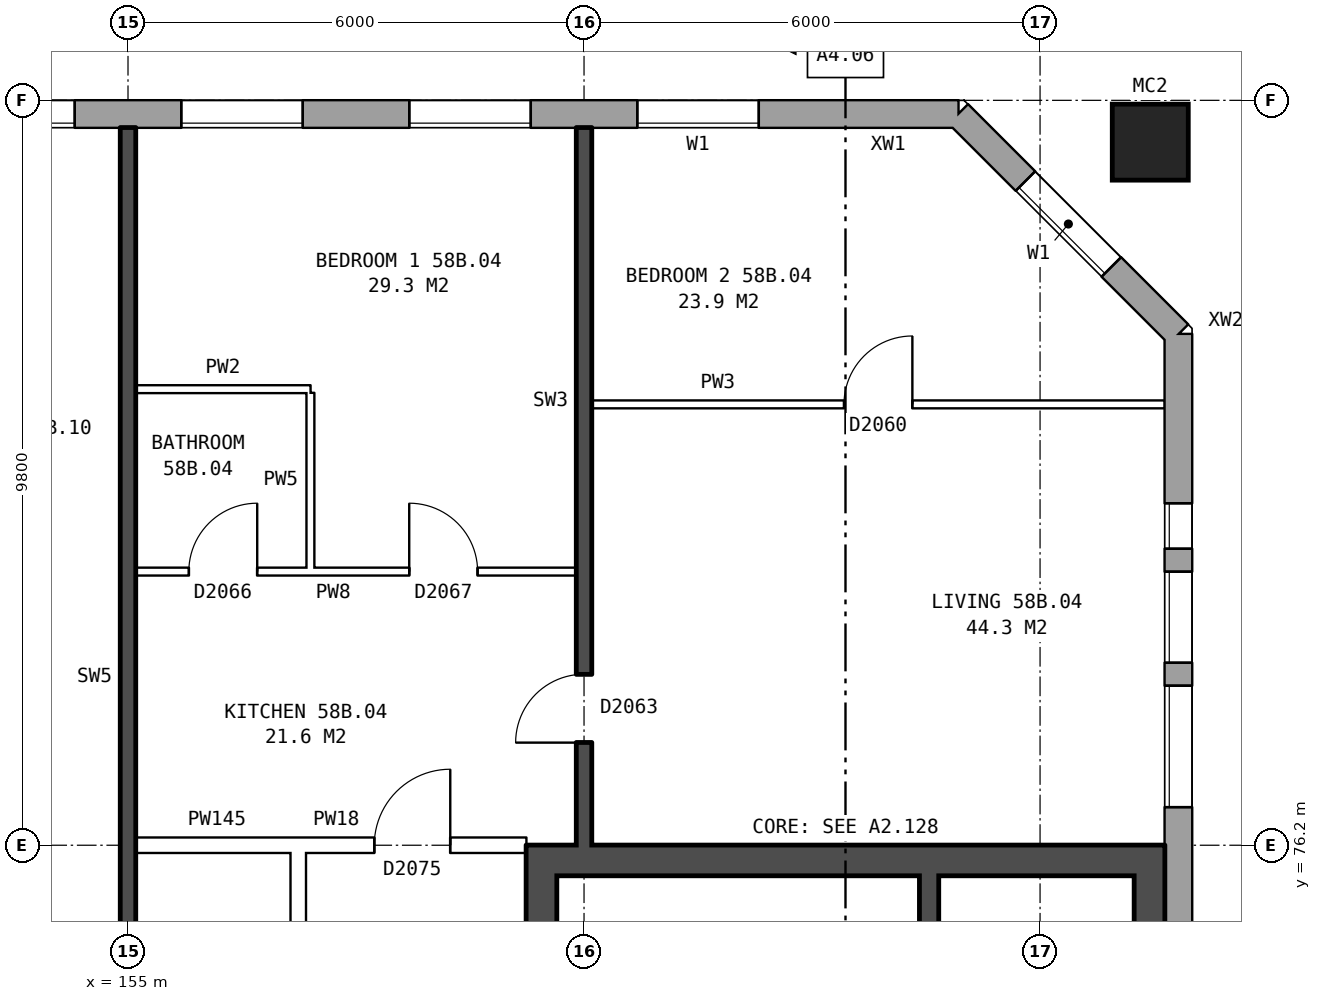
"""IFC4 building model, lengths in metres.
Left out: names, types, materials, properties, quantities, classifications, styles, units other than length and angle.
Written with IfcOpenShell. Run it as: python <this file> out.ifc"""

import sys

from ifc_helpers import new_model, si_unit, direction, frame, frame_2d, origin, origin_2d, place, context, subcontext, project, spatial, rectangle, hollow_rectangle, extrude, element, fill, save


model = new_model("IFC4")
c1 = context("Model", 3, precision=1e-05, world=origin(), true_north=direction((0.0, 1.0)))
c2 = subcontext(c1, "Body", "Model", "MODEL_VIEW")
j1 = project(units=[si_unit("LENGTHUNIT", "METRE"), si_unit("PLANEANGLEUNIT", "RADIAN")], contexts=[c1])
p1 = place(None, origin())
s1 = spatial("IfcSite", under=j1, at=p1, CompositionType="ELEMENT")
p2 = place(p1, origin())
s2 = spatial("IfcBuilding", under=s1, at=p2, CompositionType="ELEMENT")
p3 = place(p2, frame((0.0, 0.0, 205.9)))
s3 = spatial("IfcBuildingStorey", under=s2, at=p3, CompositionType="ELEMENT", Elevation=205.9)
p4 = place(p3, frame((168.45, 85.45, 0.0), z_axis=(0.0, 0.0, 1.0), x_axis=(1.0, 0.0, 0.0)))
e1 = element("IfcColumn", 1, at=p4, inside=s3, PredefinedType="COLUMN", context=c2, shape_type="SweptSolid", body=[
    extrude(hollow_rectangle(XDim=1.0, YDim=1.0, WallThickness=0.055, at=origin_2d()), origin(), (0.0, 0.0, 1.0), 3.1),
])
p5 = place(p3, frame((168.82, 57.075, 0.0), z_axis=(0.0, 0.0, 1.0), x_axis=(0.0, 1.0, 0.0)))
e2 = element("IfcWall", 2, at=p5, inside=s3, PredefinedType="STANDARD", context=c2, shape_type="SweptSolid", body=[
    extrude(rectangle(XDim=25.851, YDim=0.36, at=frame_2d((12.925, 0.0))), origin(), (0.0, 0.0, 1.0), 2.85),
])
p6 = place(p5, frame((2.225, 0.0, 0.8)))
e3 = element("IfcOpeningElement", 3, at=p6, cuts=e2, PredefinedType="OPENING", context=c2, shape_type="SweptSolid", body=[
    extrude(rectangle(XDim=0.6, YDim=0.9, at=frame_2d((0.3, 0.45))), frame((0.0, 0.19, 0.0), z_axis=(0.0, -1.0, 0.0), x_axis=(1.0, 0.0, 0.0)), (0.0, 0.0, 1.0), 0.38),
])
p7 = place(p5, frame((4.625, 0.0, 0.8)))
e4 = element("IfcOpeningElement", 4, at=p7, cuts=e2, PredefinedType="OPENING", context=c2, shape_type="SweptSolid", body=[
    extrude(rectangle(XDim=1.6, YDim=1.8, at=frame_2d((0.8, 0.9))), frame((0.0, 0.19, 0.0), z_axis=(0.0, -1.0, 0.0), x_axis=(1.0, 0.0, 0.0)), (0.0, 0.0, 1.0), 0.38),
])
p8 = place(p5, frame((19.625, 0.0, 0.8)))
e5 = element("IfcOpeningElement", 5, at=p8, cuts=e2, PredefinedType="OPENING", context=c2, shape_type="SweptSolid", body=[
    extrude(rectangle(XDim=1.6, YDim=1.8, at=frame_2d((0.8, 0.9))), frame((0.0, 0.19, 0.0), z_axis=(0.0, -1.0, 0.0), x_axis=(1.0, 0.0, 0.0)), (0.0, 0.0, 1.0), 0.38),
])
p9 = place(p5, frame((21.525, 0.0, 0.8)))
e6 = element("IfcOpeningElement", 6, at=p9, cuts=e2, PredefinedType="OPENING", context=c2, shape_type="SweptSolid", body=[
    extrude(rectangle(XDim=1.2, YDim=1.8, at=frame_2d((0.6, 0.9))), frame((0.0, 0.19, 0.0), z_axis=(0.0, -1.0, 0.0), x_axis=(1.0, 0.0, 0.0)), (0.0, 0.0, 1.0), 0.38),
])
p10 = place(p5, frame((3.125, 0.0, 0.8)))
e7 = element("IfcOpeningElement", 7, at=p10, cuts=e2, PredefinedType="OPENING", context=c2, shape_type="SweptSolid", body=[
    extrude(rectangle(XDim=1.2, YDim=1.8, at=frame_2d((0.6, 0.9))), frame((0.0, 0.19, 0.0), z_axis=(0.0, -1.0, 0.0), x_axis=(1.0, 0.0, 0.0)), (0.0, 0.0, 1.0), 0.38),
])
p11 = place(p5, frame((23.025, 0.0, 0.8)))
e8 = element("IfcOpeningElement", 8, at=p11, cuts=e2, PredefinedType="OPENING", context=c2, shape_type="SweptSolid", body=[
    extrude(rectangle(XDim=0.6, YDim=0.9, at=frame_2d((0.3, 0.45))), frame((0.0, 0.19, 0.0), z_axis=(0.0, -1.0, 0.0), x_axis=(1.0, 0.0, 0.0)), (0.0, 0.0, 1.0), 0.38),
])
p12 = place(p3, frame((168.82, 82.925, 0.0), z_axis=(0.0, 0.0, 1.0), x_axis=(-0.707106781187, 0.707106781187, 0.0)))
e9 = element("IfcWall", 9, at=p12, inside=s3, PredefinedType="STANDARD", context=c2, shape_type="SweptSolid", body=[
    extrude(rectangle(XDim=4.094, YDim=0.36, at=frame_2d((2.047, 0.0))), origin(), (0.0, 0.0, 1.0), 2.85),
])
p13 = place(p12, frame((1.247, 0.0, 0.8)))
e10 = element("IfcOpeningElement", 10, at=p13, cuts=e9, PredefinedType="OPENING", context=c2, shape_type="SweptSolid", body=[
    extrude(rectangle(XDim=1.6, YDim=1.8, at=frame_2d((0.8, 0.9))), frame((0.0, 0.19, 0.0), z_axis=(0.0, -1.0, 0.0), x_axis=(1.0, 0.0, 0.0)), (0.0, 0.0, 1.0), 0.38),
])
p14 = place(p3, frame((165.925, 85.82, 0.0), z_axis=(0.0, 0.0, 1.0), x_axis=(-1.0, 0.0, 0.0)))
e11 = element("IfcWall", 11, at=p14, inside=s3, PredefinedType="STANDARD", context=c2, shape_type="SweptSolid", body=[
    extrude(rectangle(XDim=33.875, YDim=0.36, at=frame_2d((16.938, 0.0))), origin(), (0.0, 0.0, 1.0), 2.85),
])
p15 = place(p14, frame((2.625, 0.0, 0.8)))
e12 = element("IfcOpeningElement", 12, at=p15, cuts=e11, PredefinedType="OPENING", context=c2, shape_type="SweptSolid", body=[
    extrude(rectangle(XDim=1.6, YDim=1.8, at=frame_2d((0.8, 0.9))), frame((0.0, 0.19, 0.0), z_axis=(0.0, -1.0, 0.0), x_axis=(1.0, 0.0, 0.0)), (0.0, 0.0, 1.0), 0.38),
])
p16 = place(p14, frame((5.625, 0.0, 0.8)))
e13 = element("IfcOpeningElement", 13, at=p16, cuts=e11, PredefinedType="OPENING", context=c2, shape_type="SweptSolid", body=[
    extrude(rectangle(XDim=1.6, YDim=1.8, at=frame_2d((0.8, 0.9))), frame((0.0, 0.19, 0.0), z_axis=(0.0, -1.0, 0.0), x_axis=(1.0, 0.0, 0.0)), (0.0, 0.0, 1.0), 0.38),
])
p17 = place(p14, frame((8.625, 0.0, 0.8)))
e14 = element("IfcOpeningElement", 14, at=p17, cuts=e11, PredefinedType="OPENING", context=c2, shape_type="SweptSolid", body=[
    extrude(rectangle(XDim=1.6, YDim=1.8, at=frame_2d((0.8, 0.9))), frame((0.0, 0.19, 0.0), z_axis=(0.0, -1.0, 0.0), x_axis=(1.0, 0.0, 0.0)), (0.0, 0.0, 1.0), 0.38),
])
p18 = place(p14, frame((11.625, 0.0, 0.8)))
e15 = element("IfcOpeningElement", 15, at=p18, cuts=e11, PredefinedType="OPENING", context=c2, shape_type="SweptSolid", body=[
    extrude(rectangle(XDim=1.6, YDim=1.8, at=frame_2d((0.8, 0.9))), frame((0.0, 0.19, 0.0), z_axis=(0.0, -1.0, 0.0), x_axis=(1.0, 0.0, 0.0)), (0.0, 0.0, 1.0), 0.38),
])
p19 = place(p14, frame((14.625, 0.0, 0.8)))
e16 = element("IfcOpeningElement", 16, at=p19, cuts=e11, PredefinedType="OPENING", context=c2, shape_type="SweptSolid", body=[
    extrude(rectangle(XDim=1.6, YDim=1.8, at=frame_2d((0.8, 0.9))), frame((0.0, 0.19, 0.0), z_axis=(0.0, -1.0, 0.0), x_axis=(1.0, 0.0, 0.0)), (0.0, 0.0, 1.0), 0.38),
])
p20 = place(p14, frame((17.625, 0.0, 0.8)))
e17 = element("IfcOpeningElement", 17, at=p20, cuts=e11, PredefinedType="OPENING", context=c2, shape_type="SweptSolid", body=[
    extrude(rectangle(XDim=1.6, YDim=1.8, at=frame_2d((0.8, 0.9))), frame((0.0, 0.19, 0.0), z_axis=(0.0, -1.0, 0.0), x_axis=(1.0, 0.0, 0.0)), (0.0, 0.0, 1.0), 0.38),
])
p21 = place(p14, frame((20.625, 0.0, 0.8)))
e18 = element("IfcOpeningElement", 18, at=p21, cuts=e11, PredefinedType="OPENING", context=c2, shape_type="SweptSolid", body=[
    extrude(rectangle(XDim=1.6, YDim=1.8, at=frame_2d((0.8, 0.9))), frame((0.0, 0.19, 0.0), z_axis=(0.0, -1.0, 0.0), x_axis=(1.0, 0.0, 0.0)), (0.0, 0.0, 1.0), 0.38),
])
p22 = place(p14, frame((23.625, 0.0, 0.8)))
e19 = element("IfcOpeningElement", 19, at=p22, cuts=e11, PredefinedType="OPENING", context=c2, shape_type="SweptSolid", body=[
    extrude(rectangle(XDim=1.6, YDim=1.8, at=frame_2d((0.8, 0.9))), frame((0.0, 0.19, 0.0), z_axis=(0.0, -1.0, 0.0), x_axis=(1.0, 0.0, 0.0)), (0.0, 0.0, 1.0), 0.38),
])
p23 = place(p14, frame((26.625, 0.0, 0.8)))
e20 = element("IfcOpeningElement", 20, at=p23, cuts=e11, PredefinedType="OPENING", context=c2, shape_type="SweptSolid", body=[
    extrude(rectangle(XDim=1.6, YDim=1.8, at=frame_2d((0.8, 0.9))), frame((0.0, 0.19, 0.0), z_axis=(0.0, -1.0, 0.0), x_axis=(1.0, 0.0, 0.0)), (0.0, 0.0, 1.0), 0.38),
])
p24 = place(p14, frame((29.125, 0.0, 0.8)))
e21 = element("IfcOpeningElement", 21, at=p24, cuts=e11, PredefinedType="OPENING", context=c2, shape_type="SweptSolid", body=[
    extrude(rectangle(XDim=1.4, YDim=1.8, at=frame_2d((0.7, 0.9))), frame((0.0, 0.19, 0.0), z_axis=(0.0, -1.0, 0.0), x_axis=(1.0, 0.0, 0.0)), (0.0, 0.0, 1.0), 0.38),
])
p25 = place(p14, frame((32.625, 0.0, 1.1)))
e22 = element("IfcOpeningElement", 22, at=p25, cuts=e11, PredefinedType="OPENING", context=c2, shape_type="SweptSolid", body=[
    extrude(rectangle(XDim=0.8, YDim=1.5, at=frame_2d((0.4, 0.75))), frame((0.0, 0.19, 0.0), z_axis=(0.0, -1.0, 0.0), x_axis=(1.0, 0.0, 0.0)), (0.0, 0.0, 1.0), 0.38),
])
p26 = place(p3, frame((160.44, 76.2, 0.0), z_axis=(0.0, 0.0, 1.0), x_axis=(0.0, -1.0, 0.0)))
e23 = element("IfcWall", 23, at=p26, inside=s3, PredefinedType="SHEAR", context=c2, shape_type="SweptSolid", body=[
    extrude(rectangle(XDim=12.4, YDim=0.4, at=frame_2d((6.2, 0.0))), origin(), (0.0, 0.0, 1.0), 2.85),
])
p27 = place(p26, frame((1.325, 0.0, 0.0)))
e24 = element("IfcOpeningElement", 24, at=p27, cuts=e23, PredefinedType="OPENING", context=c2, shape_type="SweptSolid", body=[
    extrude(rectangle(XDim=1.1, YDim=2.1, at=frame_2d((0.55, 1.05))), frame((0.0, 0.21, 0.0), z_axis=(0.0, -1.0, 0.0), x_axis=(1.0, 0.0, 0.0)), (0.0, 0.0, 1.0), 0.42),
])
p28 = place(p26, frame((4.825, 0.0, 0.0)))
e25 = element("IfcOpeningElement", 25, at=p28, cuts=e23, PredefinedType="OPENING", context=c2, shape_type="SweptSolid", body=[
    extrude(rectangle(XDim=0.85, YDim=2.1, at=frame_2d((0.425, 1.05))), frame((0.0, 0.21, 0.0), z_axis=(0.0, -1.0, 0.0), x_axis=(1.0, 0.0, 0.0)), (0.0, 0.0, 1.0), 0.42),
])
p29 = place(p26, frame((9.9, 0.0, 0.0)))
e26 = element("IfcOpeningElement", 26, at=p29, cuts=e23, PredefinedType="OPENING", context=c2, shape_type="SweptSolid", body=[
    extrude(rectangle(XDim=1.1, YDim=2.1, at=frame_2d((0.55, 1.05))), frame((0.0, 0.21, 0.0), z_axis=(0.0, -1.0, 0.0), x_axis=(1.0, 0.0, 0.0)), (0.0, 0.0, 1.0), 0.42),
])
p30 = place(p26, frame((8.125, 0.0, 0.0)))
e27 = element("IfcOpeningElement", 27, at=p30, cuts=e23, PredefinedType="OPENING", context=c2, shape_type="SweptSolid", body=[
    extrude(rectangle(XDim=0.85, YDim=2.1, at=frame_2d((0.425, 1.05))), frame((0.0, 0.21, 0.0), z_axis=(0.0, -1.0, 0.0), x_axis=(1.0, 0.0, 0.0)), (0.0, 0.0, 1.0), 0.42),
])
p31 = place(p3, frame((168.44, 76.2, 0.0), z_axis=(0.0, 0.0, 1.0), x_axis=(0.0, -1.0, 0.0)))
e28 = element("IfcWall", 28, at=p31, inside=s3, PredefinedType="SHEAR", context=c2, shape_type="SweptSolid", body=[
    extrude(rectangle(XDim=12.4, YDim=0.4, at=frame_2d((6.2, 0.0))), origin(), (0.0, 0.0, 1.0), 2.85),
])
p32 = place(p3, frame((160.64, 76.0, 0.0), z_axis=(0.0, 0.0, 1.0), x_axis=(1.0, 0.0, 0.0)))
e29 = element("IfcWall", 29, at=p32, inside=s3, PredefinedType="SHEAR", context=c2, shape_type="SweptSolid", body=[
    extrude(rectangle(XDim=7.6, YDim=0.4, at=frame_2d((3.8, 0.0))), origin(), (0.0, 0.0, 1.0), 2.85),
])
p33 = place(p3, frame((165.54, 75.8, 0.0), z_axis=(0.0, 0.0, 1.0), x_axis=(0.0, -1.0, 0.0)))
e30 = element("IfcWall", 30, at=p33, inside=s3, PredefinedType="SHEAR", context=c2, shape_type="SweptSolid", body=[
    extrude(rectangle(XDim=6.925, YDim=0.25, at=frame_2d((3.462, 0.0))), origin(), (0.0, 0.0, 1.0), 2.85),
])
p34 = place(p3, frame((157.24, 63.9, 0.0), z_axis=(0.0, 0.0, 1.0), x_axis=(0.0, 1.0, 0.0)))
e31 = element("IfcWall", 31, at=p34, inside=s3, PredefinedType="PARTITIONING", context=c2, shape_type="SweptSolid", body=[
    extrude(rectangle(XDim=12.2, YDim=0.2, at=frame_2d((6.1, 0.0))), origin(), (0.0, 0.0, 1.0), 2.85),
])
p35 = place(p34, frame((5.1, 0.0, 0.0)))
e32 = element("IfcOpeningElement", 32, at=p35, cuts=e31, PredefinedType="OPENING", context=c2, shape_type="SweptSolid", body=[
    extrude(rectangle(XDim=2.0, YDim=2.1, at=frame_2d((1.0, 1.05))), frame((0.0, 0.11, 0.0), z_axis=(0.0, -1.0, 0.0), x_axis=(1.0, 0.0, 0.0)), (0.0, 0.0, 1.0), 0.22),
])
p36 = place(p3, frame((155.1, 76.2, 0.0), z_axis=(0.0, 0.0, 1.0), x_axis=(1.0, 0.0, 0.0)))
e33 = element("IfcWall", 33, at=p36, inside=s3, PredefinedType="PARTITIONING", context=c2, shape_type="SweptSolid", body=[
    extrude(rectangle(XDim=2.14, YDim=0.2, at=frame_2d((1.07, 0.0))), origin(), (0.0, 0.0, 1.0), 2.85),
])
p37 = place(p3, frame((157.24, 76.2, 0.0), z_axis=(0.0, 0.0, 1.0), x_axis=(1.0, 0.0, 0.0)))
e34 = element("IfcWall", 34, at=p37, inside=s3, PredefinedType="PARTITIONING", context=c2, shape_type="SweptSolid", body=[
    extrude(rectangle(XDim=3.0, YDim=0.2, at=frame_2d((1.5, 0.0))), origin(), (0.0, 0.0, 1.0), 2.85),
])
p38 = place(p37, frame((1.0, 0.0, 0.0)))
e35 = element("IfcOpeningElement", 35, at=p38, cuts=e34, PredefinedType="OPENING", context=c2, shape_type="SweptSolid", body=[
    extrude(rectangle(XDim=1.0, YDim=2.1, at=frame_2d((0.5, 1.05))), frame((0.0, 0.11, 0.0), z_axis=(0.0, -1.0, 0.0), x_axis=(1.0, 0.0, 0.0)), (0.0, 0.0, 1.0), 0.22),
])
p39 = place(p3, frame((155.1, 79.8, 0.0), z_axis=(0.0, 0.0, 1.0), x_axis=(1.0, 0.0, 0.0)))
e36 = element("IfcWall", 36, at=p39, inside=s3, PredefinedType="PARTITIONING", context=c2, shape_type="SweptSolid", body=[
    extrude(rectangle(XDim=5.8, YDim=0.1, at=frame_2d((2.9, 0.0))), origin(), (0.0, 0.0, 1.0), 2.85),
])
p40 = place(p39, frame((3.6, 0.0, 0.0)))
e37 = element("IfcOpeningElement", 37, at=p40, cuts=e36, PredefinedType="OPENING", context=c2, shape_type="SweptSolid", body=[
    extrude(rectangle(XDim=0.9, YDim=2.1, at=frame_2d((0.45, 1.05))), frame((0.0, 0.06, 0.0), z_axis=(0.0, -1.0, 0.0), x_axis=(1.0, 0.0, 0.0)), (0.0, 0.0, 1.0), 0.12),
])
p41 = place(p39, frame((0.7, 0.0, 0.0)))
e38 = element("IfcOpeningElement", 38, at=p41, cuts=e36, PredefinedType="OPENING", context=c2, shape_type="SweptSolid", body=[
    extrude(rectangle(XDim=0.9, YDim=2.1, at=frame_2d((0.45, 1.05))), frame((0.0, 0.06, 0.0), z_axis=(0.0, -1.0, 0.0), x_axis=(1.0, 0.0, 0.0)), (0.0, 0.0, 1.0), 0.12),
])
p42 = place(p3, frame((161.1, 82.0, 0.0), z_axis=(0.0, 0.0, 1.0), x_axis=(1.0, 0.0, 0.0)))
e39 = element("IfcWall", 39, at=p42, inside=s3, PredefinedType="PARTITIONING", context=c2, shape_type="SweptSolid", body=[
    extrude(rectangle(XDim=7.54, YDim=0.1, at=frame_2d((3.77, 0.0))), origin(), (0.0, 0.0, 1.0), 2.85),
])
p43 = place(p42, frame((3.32, 0.0, 0.0)))
e40 = element("IfcOpeningElement", 40, at=p43, cuts=e39, PredefinedType="OPENING", context=c2, shape_type="SweptSolid", body=[
    extrude(rectangle(XDim=0.9, YDim=2.1, at=frame_2d((0.45, 1.05))), frame((0.0, 0.06, 0.0), z_axis=(0.0, -1.0, 0.0), x_axis=(1.0, 0.0, 0.0)), (0.0, 0.0, 1.0), 0.12),
])
p44 = place(p3, frame((155.1, 82.2, 0.0), z_axis=(0.0, 0.0, 1.0), x_axis=(1.0, 0.0, 0.0)))
e41 = element("IfcWall", 41, at=p44, inside=s3, PredefinedType="PARTITIONING", context=c2, shape_type="SweptSolid", body=[
    extrude(rectangle(XDim=2.3, YDim=0.1, at=frame_2d((1.15, 0.0))), origin(), (0.0, 0.0, 1.0), 2.85),
])
p45 = place(p3, frame((155.0, 71.2, 0.0), z_axis=(0.0, 0.0, 1.0), x_axis=(0.0, 1.0, 0.0)))
e42 = element("IfcWall", 42, at=p45, inside=s3, PredefinedType="SOLIDWALL", context=c2, shape_type="SweptSolid", body=[
    extrude(rectangle(XDim=14.44, YDim=0.2, at=frame_2d((7.22, 0.0))), origin(), (0.0, 0.0, 1.0), 2.85),
])
p46 = place(p3, frame((157.4, 79.85, 0.0), z_axis=(0.0, 0.0, 1.0), x_axis=(0.0, 1.0, 0.0)))
e43 = element("IfcWall", 43, at=p46, inside=s3, PredefinedType="PARTITIONING", context=c2, shape_type="SweptSolid", body=[
    extrude(rectangle(XDim=2.3, YDim=0.1, at=frame_2d((1.15, 0.0))), origin(), (0.0, 0.0, 1.0), 2.85),
])
p47 = place(p3, frame((161.0, 76.2, 0.0), z_axis=(0.0, 0.0, 1.0), x_axis=(0.0, 1.0, 0.0)))
e44 = element("IfcWall", 44, at=p47, inside=s3, PredefinedType="SOLIDWALL", context=c2, shape_type="SweptSolid", body=[
    extrude(rectangle(XDim=9.44, YDim=0.2, at=frame_2d((4.72, 0.0))), origin(), (0.0, 0.0, 1.0), 2.85),
])
p48 = place(p47, frame((1.35, 0.0, 0.0)))
e45 = element("IfcOpeningElement", 45, at=p48, cuts=e44, PredefinedType="OPENING", context=c2, shape_type="SweptSolid", body=[
    extrude(rectangle(XDim=0.9, YDim=2.1, at=frame_2d((0.45, 1.05))), frame((0.0, 0.11, 0.0), z_axis=(0.0, -1.0, 0.0), x_axis=(1.0, 0.0, 0.0)), (0.0, 0.0, 1.0), 0.22),
])
p49 = place(p8, origin())
e46 = element("IfcWindow", 46, at=p49, inside=s3, PartitioningType="SINGLE_PANEL", PredefinedType="WINDOW", context=c2, shape_type="SweptSolid", body=[
    extrude(rectangle(XDim=1.6, YDim=1.8, at=frame_2d((0.8, 0.9))), frame((0.0, 0.15, 0.0), z_axis=(0.0, -1.0, 0.0), x_axis=(1.0, 0.0, 0.0)), (0.0, 0.0, 1.0), 0.06),
])
fill(e5, e46)
p50 = place(p9, origin())
e47 = element("IfcWindow", 47, at=p50, inside=s3, PartitioningType="SINGLE_PANEL", PredefinedType="WINDOW", context=c2, shape_type="SweptSolid", body=[
    extrude(rectangle(XDim=1.2, YDim=1.8, at=frame_2d((0.6, 0.9))), frame((0.0, 0.15, 0.0), z_axis=(0.0, -1.0, 0.0), x_axis=(1.0, 0.0, 0.0)), (0.0, 0.0, 1.0), 0.06),
])
fill(e6, e47)
p51 = place(p13, origin())
e48 = element("IfcWindow", 48, at=p51, inside=s3, PartitioningType="SINGLE_PANEL", PredefinedType="WINDOW", context=c2, shape_type="SweptSolid", body=[
    extrude(rectangle(XDim=1.6, YDim=1.8, at=frame_2d((0.8, 0.9))), frame((0.0, 0.15, 0.0), z_axis=(0.0, -1.0, 0.0), x_axis=(1.0, 0.0, 0.0)), (0.0, 0.0, 1.0), 0.06),
])
fill(e10, e48)
p52 = place(p15, origin())
e49 = element("IfcWindow", 49, at=p52, inside=s3, PartitioningType="SINGLE_PANEL", PredefinedType="WINDOW", context=c2, shape_type="SweptSolid", body=[
    extrude(rectangle(XDim=1.6, YDim=1.8, at=frame_2d((0.8, 0.9))), frame((0.0, 0.15, 0.0), z_axis=(0.0, -1.0, 0.0), x_axis=(1.0, 0.0, 0.0)), (0.0, 0.0, 1.0), 0.06),
])
fill(e12, e49)
p53 = place(p16, origin())
e50 = element("IfcWindow", 50, at=p53, inside=s3, PartitioningType="SINGLE_PANEL", PredefinedType="WINDOW", context=c2, shape_type="SweptSolid", body=[
    extrude(rectangle(XDim=1.6, YDim=1.8, at=frame_2d((0.8, 0.9))), frame((0.0, 0.15, 0.0), z_axis=(0.0, -1.0, 0.0), x_axis=(1.0, 0.0, 0.0)), (0.0, 0.0, 1.0), 0.06),
])
fill(e13, e50)
p54 = place(p17, origin())
e51 = element("IfcWindow", 51, at=p54, inside=s3, PartitioningType="SINGLE_PANEL", PredefinedType="WINDOW", context=c2, shape_type="SweptSolid", body=[
    extrude(rectangle(XDim=1.6, YDim=1.8, at=frame_2d((0.8, 0.9))), frame((0.0, 0.15, 0.0), z_axis=(0.0, -1.0, 0.0), x_axis=(1.0, 0.0, 0.0)), (0.0, 0.0, 1.0), 0.06),
])
fill(e14, e51)
p55 = place(p18, origin())
e52 = element("IfcWindow", 52, at=p55, inside=s3, PartitioningType="SINGLE_PANEL", PredefinedType="WINDOW", context=c2, shape_type="SweptSolid", body=[
    extrude(rectangle(XDim=1.6, YDim=1.8, at=frame_2d((0.8, 0.9))), frame((0.0, 0.15, 0.0), z_axis=(0.0, -1.0, 0.0), x_axis=(1.0, 0.0, 0.0)), (0.0, 0.0, 1.0), 0.06),
])
fill(e15, e52)
p56 = place(p40, origin())
e53 = element("IfcDoor", 53, at=p56, inside=s3, OperationType="SINGLE_SWING_LEFT", PredefinedType="DOOR", context=c2, shape_type="SweptSolid", body=[
    extrude(rectangle(XDim=0.9, YDim=2.1, at=frame_2d((0.45, 1.05))), frame((0.0, 0.025, 0.0), z_axis=(0.0, -1.0, 0.0), x_axis=(1.0, 0.0, 0.0)), (0.0, 0.0, 1.0), 0.05),
])
fill(e37, e53)
p57 = place(p43, origin())
e54 = element("IfcDoor", 54, at=p57, inside=s3, OperationType="SINGLE_SWING_RIGHT", PredefinedType="DOOR", context=c2, shape_type="SweptSolid", body=[
    extrude(rectangle(XDim=0.9, YDim=2.1, at=frame_2d((0.45, 1.05))), frame((0.0, 0.025, 0.0), z_axis=(0.0, -1.0, 0.0), x_axis=(1.0, 0.0, 0.0)), (0.0, 0.0, 1.0), 0.05),
])
fill(e40, e54)
p58 = place(p38, origin())
e55 = element("IfcDoor", 55, at=p58, inside=s3, OperationType="SINGLE_SWING_RIGHT", PredefinedType="DOOR", context=c2, shape_type="SweptSolid", body=[
    extrude(rectangle(XDim=1.0, YDim=2.1, at=frame_2d((0.5, 1.05))), frame((0.0, 0.025, 0.0), z_axis=(0.0, -1.0, 0.0), x_axis=(1.0, 0.0, 0.0)), (0.0, 0.0, 1.0), 0.05),
])
fill(e35, e55)
p59 = place(p48, origin())
e56 = element("IfcDoor", 56, at=p59, inside=s3, OperationType="SINGLE_SWING_LEFT", PredefinedType="DOOR", context=c2, shape_type="SweptSolid", body=[
    extrude(rectangle(XDim=0.9, YDim=2.1, at=frame_2d((0.45, 1.05))), frame((0.0, 0.025, 0.0), z_axis=(0.0, -1.0, 0.0), x_axis=(1.0, 0.0, 0.0)), (0.0, 0.0, 1.0), 0.05),
])
fill(e45, e56)
p60 = place(p41, origin())
e57 = element("IfcDoor", 57, at=p60, inside=s3, OperationType="SINGLE_SWING_RIGHT", PredefinedType="DOOR", context=c2, shape_type="SweptSolid", body=[
    extrude(rectangle(XDim=0.9, YDim=2.1, at=frame_2d((0.45, 1.05))), frame((0.0, 0.025, 0.0), z_axis=(0.0, -1.0, 0.0), x_axis=(1.0, 0.0, 0.0)), (0.0, 0.0, 1.0), 0.05),
])
fill(e38, e57)
p61 = place(p11, origin())
e58 = element("IfcWindow", 58, at=p61, inside=s3, PartitioningType="SINGLE_PANEL", PredefinedType="WINDOW", context=c2, shape_type="SweptSolid", body=[
    extrude(rectangle(XDim=0.6, YDim=0.9, at=frame_2d((0.3, 0.45))), frame((0.0, 0.15, 0.0), z_axis=(0.0, -1.0, 0.0), x_axis=(1.0, 0.0, 0.0)), (0.0, 0.0, 1.0), 0.06),
])
fill(e8, e58)
save(model, sys.argv[1])
